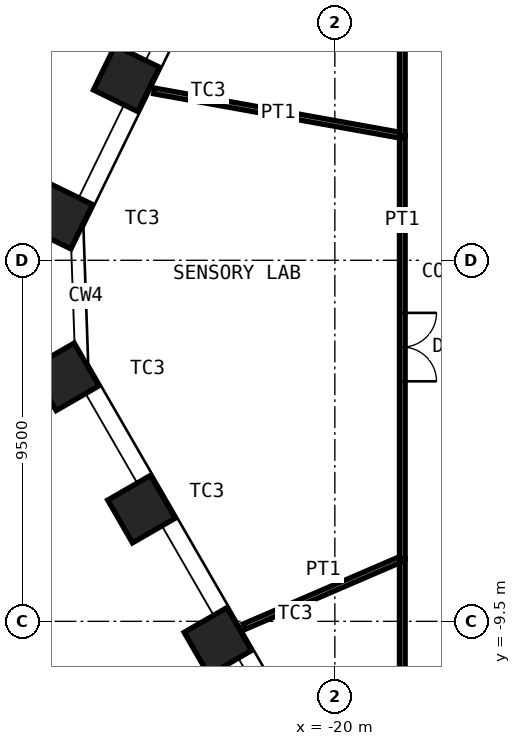
"""IFC4 building model, lengths in metres.
Left out: names, types, materials, properties, quantities, classifications, styles, units other than length and angle.
Written with IfcOpenShell. Run it as: python <this file> out.ifc"""

import sys

from ifc_helpers import new_model, si_unit, direction, frame, frame_2d, origin, origin_2d, place, context, subcontext, project, spatial, rectangle, hollow_rectangle, extrude, element, fill, save


model = new_model("IFC4")
c1 = context("Model", 3, precision=1e-05, world=origin(), true_north=direction((0.0, 1.0)))
c2 = subcontext(c1, "Body", "Model", "MODEL_VIEW")
j1 = project(units=[si_unit("LENGTHUNIT", "METRE"), si_unit("PLANEANGLEUNIT", "RADIAN")], contexts=[c1])
p1 = place(None, origin())
s1 = spatial("IfcSite", under=j1, at=p1, CompositionType="ELEMENT")
p2 = place(p1, origin())
s2 = spatial("IfcBuilding", under=s1, at=p2, CompositionType="ELEMENT")
p3 = place(p2, frame((0.0, 0.0, 124.0)))
s3 = spatial("IfcBuildingStorey", under=s2, at=p3, CompositionType="ELEMENT", Elevation=124.0)
for number, where, z_axis, x_axis in (
    (1, (-23.078, -10.028, 0.0), (0.0, 0.0, 1.0), (0.5, -0.866, 0.0)),
    (2, (-25.087, -6.547, 0.0), (0.0, 0.0, 1.0), (0.5, -0.866, 0.0)),
    (3, (-27.097, -3.067, 0.0), (0.0, 0.0, 1.0), (0.5, -0.866, 0.0)),
    (4, (-27.245, 1.169, 0.0), (0.0, 0.0, 1.0), (-0.438, -0.899, 0.0)),
    (5, (-25.483, 4.781, 0.0), (0.0, 0.0, 1.0), (-0.438, -0.899, 0.0)),
):
    element("IfcColumn", number, at=place(p3, frame(where, z_axis=z_axis, x_axis=x_axis)), inside=s3, PredefinedType="COLUMN", context=c2, shape_type="SweptSolid", body=[
        extrude(hollow_rectangle(XDim=1.3, YDim=1.3, WallThickness=0.1, at=origin_2d()), origin(), (0.0, 0.0, 1.0), 4.2),
    ])
p4 = place(p3, frame((-18.225, -11.625, 0.0), z_axis=(0.0, 0.0, 1.0), x_axis=(0.0, 1.0, 0.0)))
e6 = element("IfcWall", 6, at=p4, inside=s3, PredefinedType="PARTITIONING", context=c2, shape_type="SweptSolid", body=[
    extrude(rectangle(XDim=3.776, YDim=0.15, at=frame_2d((1.888, 0.0))), origin(), (0.0, 0.0, 1.0), 4.03),
])
p5 = place(p3, frame((-22.38, -9.638, 0.0), z_axis=(0.0, 0.0, 1.0), x_axis=(0.918428905659, 0.395586078181, 0.0)))
e7 = element("IfcWall", 7, at=p5, inside=s3, PredefinedType="PARTITIONING", context=c2, shape_type="SweptSolid", body=[
    extrude(rectangle(XDim=4.524, YDim=0.15, at=frame_2d((2.262, 0.0))), origin(), (0.0, 0.0, 1.0), 3.33),
])
p6 = place(p3, frame((-18.225, -7.849, 0.0), z_axis=(0.0, 0.0, 1.0), x_axis=(0.0, 1.0, 0.0)))
e8 = element("IfcWall", 8, at=p6, inside=s3, PredefinedType="PARTITIONING", context=c2, shape_type="SweptSolid", body=[
    extrude(rectangle(XDim=11.13, YDim=0.15, at=frame_2d((5.565, 0.0))), origin(), (0.0, 0.0, 1.0), 4.03),
])
p7 = place(p6, frame((4.665, 0.0, 0.0)))
e9 = element("IfcOpeningElement", 9, at=p7, cuts=e8, PredefinedType="OPENING", context=c2, shape_type="SweptSolid", body=[
    extrude(rectangle(XDim=1.8, YDim=2.4, at=frame_2d((0.9, 1.2))), frame((0.0, 0.085, 0.0), z_axis=(0.0, -1.0, 0.0), x_axis=(1.0, 0.0, 0.0)), (0.0, 0.0, 1.0), 0.17),
])
p8 = place(p3, frame((-24.755, 4.457, 0.0), z_axis=(0.0, 0.0, 1.0), x_axis=(0.984174598206, -0.177201467959, 0.0)))
e10 = element("IfcWall", 10, at=p8, inside=s3, PredefinedType="PARTITIONING", context=c2, shape_type="SweptSolid", body=[
    extrude(rectangle(XDim=6.635, YDim=0.15, at=frame_2d((3.318, 0.0))), origin(), (0.0, 0.0, 1.0), 3.33),
])
p9 = place(p3, frame((-18.225, 3.281, 0.0), z_axis=(0.0, 0.0, 1.0), x_axis=(0.0, 1.0, 0.0)))
e11 = element("IfcWall", 11, at=p9, inside=s3, PredefinedType="PARTITIONING", context=c2, shape_type="SweptSolid", body=[
    extrude(rectangle(XDim=8.344, YDim=0.15, at=frame_2d((4.172, 0.0))), origin(), (0.0, 0.0, 1.0), 4.03),
])
p10 = place(p9, frame((3.272, 0.0, 0.0)))
e12 = element("IfcOpeningElement", 12, at=p10, cuts=e11, PredefinedType="OPENING", context=c2, shape_type="SweptSolid", body=[
    extrude(rectangle(XDim=1.8, YDim=2.4, at=frame_2d((0.9, 1.2))), frame((0.0, 0.085, 0.0), z_axis=(0.0, -1.0, 0.0), x_axis=(1.0, 0.0, 0.0)), (0.0, 0.0, 1.0), 0.17),
])
p11 = place(p7, origin())
e13 = element("IfcDoor", 13, at=p11, inside=s3, OperationType="DOUBLE_DOOR_DOUBLE_SWING", PredefinedType="DOOR", context=c2, shape_type="SweptSolid", body=[
    extrude(rectangle(XDim=1.8, YDim=2.4, at=frame_2d((0.9, 1.2))), frame((0.0, 0.025, 0.0), z_axis=(0.0, -1.0, 0.0), x_axis=(1.0, 0.0, 0.0)), (0.0, 0.0, 1.0), 0.05),
])
fill(e9, e13)
save(model, sys.argv[1])
